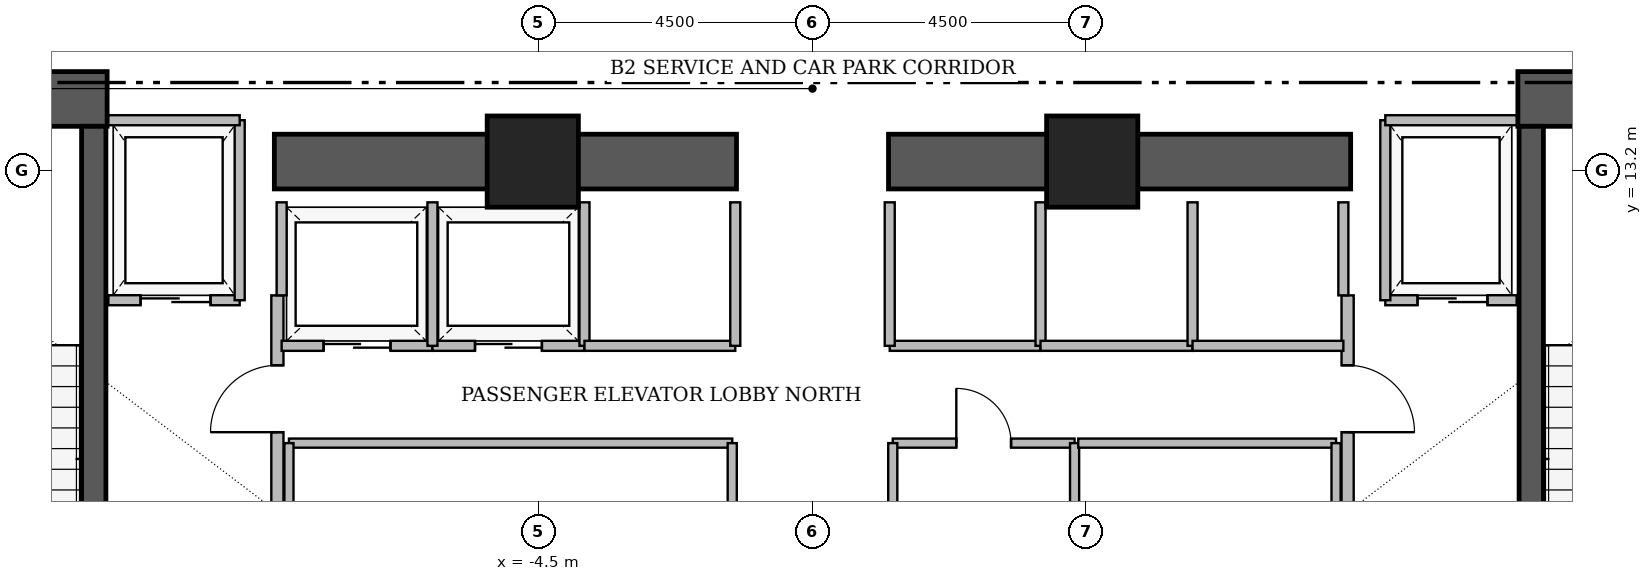
"""IFC4 building model, lengths in metres.
Left out: names, types, materials, properties, quantities, classifications, styles, units other than length and angle.
Written with IfcOpenShell. Run it as: python <this file> out.ifc"""

import sys

from ifc_helpers import new_model, si_unit, direction, frame, frame_2d, origin, origin_2d, place, context, subcontext, project, spatial, rectangle, extrude, element, fill, save


model = new_model("IFC4")
c1 = context("Model", 3, precision=1e-05, world=origin(), true_north=direction((0.0, 1.0)))
c2 = subcontext(c1, "Body", "Model", "MODEL_VIEW")
j1 = project(units=[si_unit("LENGTHUNIT", "METRE"), si_unit("PLANEANGLEUNIT", "RADIAN")], contexts=[c1])
p1 = place(None, origin())
s1 = spatial("IfcSite", under=j1, at=p1, CompositionType="ELEMENT")
p2 = place(p1, origin())
s2 = spatial("IfcBuilding", under=s1, at=p2, CompositionType="ELEMENT")
p3 = place(p2, frame((0.0, 0.0, -9.0)))
s3 = spatial("IfcBuildingStorey", under=s2, at=p3, CompositionType="ELEMENT", Elevation=-9.0)
for number, where, z_axis, x_axis in (
    (1, (-16.31, 14.38, 0.0), (0.0, 0.0, 1.0), (1.0, 0.0, 0.0)),
    (2, (11.6, 14.38, 0.0), (0.0, 0.0, 1.0), (1.0, 0.0, 0.0)),
):
    element("IfcWall", number, at=place(p3, frame(where, z_axis=z_axis, x_axis=x_axis)), inside=s3, PredefinedType="SHEAR", context=c2, shape_type="SweptSolid", body=[
        extrude(rectangle(XDim=4.71, YDim=0.9, at=frame_2d((2.355, 0.0))), origin(), (0.0, 0.0, 1.0), 4.31),
    ])
for number, where, z_axis, x_axis in (
    (3, (-8.85, 13.35, 0.0), (0.0, 0.0, 1.0), (1.0, 0.0, 0.0)),
    (4, (1.25, 13.35, 0.0), (0.0, 0.0, 1.0), (1.0, 0.0, 0.0)),
):
    element("IfcWall", number, at=place(p3, frame(where, z_axis=z_axis, x_axis=x_axis)), inside=s3, PredefinedType="SHEAR", context=c2, shape_type="SweptSolid", body=[
        extrude(rectangle(XDim=7.6, YDim=0.9, at=frame_2d((3.8, 0.0))), origin(), (0.0, 0.0, 1.0), 4.24),
    ])
p4 = place(p3, frame((-11.82, 4.97, 0.0), z_axis=(0.0, 0.0, 1.0), x_axis=(0.0, 1.0, 0.0)))
e5 = element("IfcWall", 5, at=p4, inside=s3, PredefinedType="SHEAR", context=c2, shape_type="SweptSolid", body=[
    extrude(rectangle(XDim=8.96, YDim=0.4, at=frame_2d((4.48, 0.0))), origin(), (0.0, 0.0, 1.0), 4.31),
])
p5 = place(p4, frame((0.31, 0.0, 0.0)))
e6 = element("IfcOpeningElement", 6, at=p5, cuts=e5, PredefinedType="OPENING", context=c2, shape_type="SweptSolid", body=[
    extrude(rectangle(XDim=1.12, YDim=2.22, at=frame_2d((0.56, 1.11))), frame((0.0, 0.21, 0.0), z_axis=(0.0, -1.0, 0.0), x_axis=(1.0, 0.0, 0.0)), (0.0, 0.0, 1.0), 0.42),
])
p6 = place(p3, frame((11.82, 13.93, 0.0), z_axis=(0.0, 0.0, 1.0), x_axis=(0.0, -1.0, 0.0)))
e7 = element("IfcWall", 7, at=p6, inside=s3, PredefinedType="SHEAR", context=c2, shape_type="SweptSolid", body=[
    extrude(rectangle(XDim=8.96, YDim=0.4, at=frame_2d((4.48, 0.0))), origin(), (0.0, 0.0, 1.0), 4.31),
])
p7 = place(p6, frame((7.53, 0.0, 0.0)))
e8 = element("IfcOpeningElement", 8, at=p7, cuts=e7, PredefinedType="OPENING", context=c2, shape_type="SweptSolid", body=[
    extrude(rectangle(XDim=1.12, YDim=2.22, at=frame_2d((0.56, 1.11))), frame((0.0, 0.21, 0.0), z_axis=(0.0, -1.0, 0.0), x_axis=(1.0, 0.0, 0.0)), (0.0, 0.0, 1.0), 0.42),
])
for number, where, z_axis, x_axis in (
    (9, (-4.6, 13.35, 0.0), (0.0, 0.0, 1.0), (1.0, 0.0, 0.0)),
    (10, (4.6, 13.35, 0.0), (0.0, 0.0, 1.0), (1.0, 0.0, 0.0)),
):
    element("IfcColumn", number, at=place(p3, frame(where, z_axis=z_axis, x_axis=x_axis)), inside=s3, PredefinedType="COLUMN", context=c2, shape_type="SweptSolid", body=[
        extrude(rectangle(XDim=1.5, YDim=1.5, at=origin_2d()), origin(), (0.0, 0.0, 1.0), 4.5),
    ])
p8 = place(p3, frame((-8.8, 5.05, 0.0), z_axis=(0.0, 0.0, 1.0), x_axis=(0.0, 1.0, 0.0)))
e11 = element("IfcWall", 11, at=p8, inside=s3, PredefinedType="PARTITIONING", context=c2, shape_type="SweptSolid", body=[
    extrude(rectangle(XDim=6.1, YDim=0.2, at=frame_2d((3.05, 0.0))), origin(), (0.0, 0.0, 1.0), 4.24),
])
p9 = place(p8, frame((0.25, 0.0, 0.0)))
e12 = element("IfcOpeningElement", 12, at=p9, cuts=e11, PredefinedType="OPENING", context=c2, shape_type="SweptSolid", body=[
    extrude(rectangle(XDim=1.1, YDim=2.2, at=frame_2d((0.55, 1.1))), frame((0.0, 0.11, 0.0), z_axis=(0.0, -1.0, 0.0), x_axis=(1.0, 0.0, 0.0)), (0.0, 0.0, 1.0), 0.22),
])
p10 = place(p8, frame((3.85, 0.0, 0.0)))
e13 = element("IfcOpeningElement", 13, at=p10, cuts=e11, PredefinedType="OPENING", context=c2, shape_type="SweptSolid", body=[
    extrude(rectangle(XDim=1.1, YDim=2.2, at=frame_2d((0.55, 1.1))), frame((0.0, 0.11, 0.0), z_axis=(0.0, -1.0, 0.0), x_axis=(1.0, 0.0, 0.0)), (0.0, 0.0, 1.0), 0.22),
])
p11 = place(p3, frame((8.8, 11.15, 0.0), z_axis=(0.0, 0.0, 1.0), x_axis=(0.0, -1.0, 0.0)))
e14 = element("IfcWall", 14, at=p11, inside=s3, PredefinedType="PARTITIONING", context=c2, shape_type="SweptSolid", body=[
    extrude(rectangle(XDim=6.1, YDim=0.2, at=frame_2d((3.05, 0.0))), origin(), (0.0, 0.0, 1.0), 4.24),
])
p12 = place(p11, frame((1.15, 0.0, 0.0)))
e15 = element("IfcOpeningElement", 15, at=p12, cuts=e14, PredefinedType="OPENING", context=c2, shape_type="SweptSolid", body=[
    extrude(rectangle(XDim=1.1, YDim=2.2, at=frame_2d((0.55, 1.1))), frame((0.0, 0.11, 0.0), z_axis=(0.0, -1.0, 0.0), x_axis=(1.0, 0.0, 0.0)), (0.0, 0.0, 1.0), 0.22),
])
p13 = place(p11, frame((4.75, 0.0, 0.0)))
e16 = element("IfcOpeningElement", 16, at=p13, cuts=e14, PredefinedType="OPENING", context=c2, shape_type="SweptSolid", body=[
    extrude(rectangle(XDim=1.1, YDim=2.2, at=frame_2d((0.55, 1.1))), frame((0.0, 0.11, 0.0), z_axis=(0.0, -1.0, 0.0), x_axis=(1.0, 0.0, 0.0)), (0.0, 0.0, 1.0), 0.22),
])
p14 = place(p3, frame((-11.58, 11.07, 0.0), z_axis=(0.0, 0.0, 1.0), x_axis=(1.0, 0.0, 0.0)))
e17 = element("IfcWall", 17, at=p14, inside=s3, PredefinedType="PARTITIONING", context=c2, shape_type="SweptSolid", body=[
    extrude(rectangle(XDim=2.16, YDim=0.165, at=frame_2d((1.08, 0.0))), origin(), (0.0, 0.0, 1.0), 4.24),
])
p15 = place(p14, frame((0.53, 0.0, 0.0)))
e18 = element("IfcOpeningElement", 18, at=p15, cuts=e17, PredefinedType="OPENING", context=c2, shape_type="SweptSolid", body=[
    extrude(rectangle(XDim=1.15, YDim=2.25, at=frame_2d((0.575, 1.125))), frame((0.0, 0.093, 0.0), z_axis=(0.0, -1.0, 0.0), x_axis=(1.0, 0.0, 0.0)), (0.0, 0.0, 1.0), 0.185),
])
p16 = place(p3, frame((9.42, 11.07, 0.0), z_axis=(0.0, 0.0, 1.0), x_axis=(1.0, 0.0, 0.0)))
e19 = element("IfcWall", 19, at=p16, inside=s3, PredefinedType="PARTITIONING", context=c2, shape_type="SweptSolid", body=[
    extrude(rectangle(XDim=2.16, YDim=0.165, at=frame_2d((1.08, 0.0))), origin(), (0.0, 0.0, 1.0), 4.24),
])
p17 = place(p16, frame((0.53, 0.0, 0.0)))
e20 = element("IfcOpeningElement", 20, at=p17, cuts=e19, PredefinedType="OPENING", context=c2, shape_type="SweptSolid", body=[
    extrude(rectangle(XDim=1.15, YDim=2.25, at=frame_2d((0.575, 1.125))), frame((0.0, 0.093, 0.0), z_axis=(0.0, -1.0, 0.0), x_axis=(1.0, 0.0, 0.0)), (0.0, 0.0, 1.0), 0.185),
])
p18 = place(p3, frame((-8.73, 10.32, 0.0), z_axis=(0.0, 0.0, 1.0), x_axis=(1.0, 0.0, 0.0)))
e21 = element("IfcWall", 21, at=p18, inside=s3, PredefinedType="PARTITIONING", context=c2, shape_type="SweptSolid", body=[
    extrude(rectangle(XDim=2.48, YDim=0.165, at=frame_2d((1.24, 0.0))), origin(), (0.0, 0.0, 1.0), 4.24),
])
p19 = place(p18, frame((0.69, 0.0, 0.0)))
e22 = element("IfcOpeningElement", 22, at=p19, cuts=e21, PredefinedType="OPENING", context=c2, shape_type="SweptSolid", body=[
    extrude(rectangle(XDim=1.1, YDim=2.25, at=frame_2d((0.55, 1.125))), frame((0.0, 0.093, 0.0), z_axis=(0.0, -1.0, 0.0), x_axis=(1.0, 0.0, 0.0)), (0.0, 0.0, 1.0), 0.185),
])
p20 = place(p3, frame((-6.25, 10.32, 0.0), z_axis=(0.0, 0.0, 1.0), x_axis=(1.0, 0.0, 0.0)))
e23 = element("IfcWall", 23, at=p20, inside=s3, PredefinedType="PARTITIONING", context=c2, shape_type="SweptSolid", body=[
    extrude(rectangle(XDim=2.5, YDim=0.165, at=frame_2d((1.25, 0.0))), origin(), (0.0, 0.0, 1.0), 4.24),
])
p21 = place(p20, frame((0.7, 0.0, 0.0)))
e24 = element("IfcOpeningElement", 24, at=p21, cuts=e23, PredefinedType="OPENING", context=c2, shape_type="SweptSolid", body=[
    extrude(rectangle(XDim=1.1, YDim=2.25, at=frame_2d((0.55, 1.125))), frame((0.0, 0.093, 0.0), z_axis=(0.0, -1.0, 0.0), x_axis=(1.0, 0.0, 0.0)), (0.0, 0.0, 1.0), 0.185),
])
p22 = place(p3, frame((1.32, 8.72, 0.0), z_axis=(0.0, 0.0, 1.0), x_axis=(1.0, 0.0, 0.0)))
e25 = element("IfcWall", 25, at=p22, inside=s3, PredefinedType="PARTITIONING", context=c2, shape_type="SweptSolid", body=[
    extrude(rectangle(XDim=2.99, YDim=0.15, at=frame_2d((1.495, 0.0))), origin(), (0.0, 0.0, 1.0), 4.24),
])
p23 = place(p22, frame((1.045, 0.0, 0.0)))
e26 = element("IfcOpeningElement", 26, at=p23, cuts=e25, PredefinedType="OPENING", context=c2, shape_type="SweptSolid", body=[
    extrude(rectangle(XDim=0.9, YDim=2.15, at=frame_2d((0.45, 1.075))), frame((0.0, 0.085, 0.0), z_axis=(0.0, -1.0, 0.0), x_axis=(1.0, 0.0, 0.0)), (0.0, 0.0, 1.0), 0.17),
])
p24 = place(p3, frame((-9.42, 11.07, 0.0), z_axis=(0.0, 0.0, 1.0), x_axis=(0.0, 1.0, 0.0)))
e27 = element("IfcWall", 27, at=p24, inside=s3, PredefinedType="PARTITIONING", context=c2, shape_type="SweptSolid", body=[
    extrude(rectangle(XDim=2.96, YDim=0.165, at=frame_2d((1.48, 0.0))), origin(), (0.0, 0.0, 1.0), 4.24),
])
p25 = place(p3, frame((-11.58, 14.03, 0.0), z_axis=(0.0, 0.0, 1.0), x_axis=(1.0, 0.0, 0.0)))
e28 = element("IfcWall", 28, at=p25, inside=s3, PredefinedType="PARTITIONING", context=c2, shape_type="SweptSolid", body=[
    extrude(rectangle(XDim=2.16, YDim=0.165, at=frame_2d((1.08, 0.0))), origin(), (0.0, 0.0, 1.0), 4.24),
])
p26 = place(p3, frame((9.42, 11.07, 0.0), z_axis=(0.0, 0.0, 1.0), x_axis=(0.0, 1.0, 0.0)))
e29 = element("IfcWall", 29, at=p26, inside=s3, PredefinedType="PARTITIONING", context=c2, shape_type="SweptSolid", body=[
    extrude(rectangle(XDim=2.96, YDim=0.165, at=frame_2d((1.48, 0.0))), origin(), (0.0, 0.0, 1.0), 4.24),
])
p27 = place(p3, frame((9.42, 14.03, 0.0), z_axis=(0.0, 0.0, 1.0), x_axis=(1.0, 0.0, 0.0)))
e30 = element("IfcWall", 30, at=p27, inside=s3, PredefinedType="PARTITIONING", context=c2, shape_type="SweptSolid", body=[
    extrude(rectangle(XDim=2.16, YDim=0.165, at=frame_2d((1.08, 0.0))), origin(), (0.0, 0.0, 1.0), 4.24),
])
p28 = place(p3, frame((-8.73, 11.15, 0.0), z_axis=(0.0, 0.0, 1.0), x_axis=(0.0, 1.0, 0.0)))
e31 = element("IfcWall", 31, at=p28, inside=s3, PredefinedType="PARTITIONING", context=c2, shape_type="SweptSolid", body=[
    extrude(rectangle(XDim=1.53, YDim=0.165, at=frame_2d((0.765, 0.0))), origin(), (0.0, 0.0, 1.0), 4.24),
])
for number, where, z_axis, x_axis in (
    (32, (-6.25, 10.32, 0.0), (0.0, 0.0, 1.0), (0.0, 1.0, 0.0)),
    (33, (-3.75, 10.32, 0.0), (0.0, 0.0, 1.0), (0.0, 1.0, 0.0)),
):
    element("IfcWall", number, at=place(p3, frame(where, z_axis=z_axis, x_axis=x_axis)), inside=s3, PredefinedType="PARTITIONING", context=c2, shape_type="SweptSolid", body=[
        extrude(rectangle(XDim=2.36, YDim=0.165, at=frame_2d((1.18, 0.0))), origin(), (0.0, 0.0, 1.0), 4.24),
    ])
p29 = place(p3, frame((-3.75, 10.32, 0.0), z_axis=(0.0, 0.0, 1.0), x_axis=(1.0, 0.0, 0.0)))
e34 = element("IfcWall", 34, at=p29, inside=s3, PredefinedType="PARTITIONING", context=c2, shape_type="SweptSolid", body=[
    extrude(rectangle(XDim=2.48, YDim=0.165, at=frame_2d((1.24, 0.0))), origin(), (0.0, 0.0, 1.0), 4.24),
])
p30 = place(p3, frame((-1.27, 10.32, 0.0), z_axis=(0.0, 0.0, 1.0), x_axis=(0.0, 1.0, 0.0)))
e35 = element("IfcWall", 35, at=p30, inside=s3, PredefinedType="PARTITIONING", context=c2, shape_type="SweptSolid", body=[
    extrude(rectangle(XDim=2.36, YDim=0.165, at=frame_2d((1.18, 0.0))), origin(), (0.0, 0.0, 1.0), 4.24),
])
p31 = place(p3, frame((1.27, 10.32, 0.0), z_axis=(0.0, 0.0, 1.0), x_axis=(1.0, 0.0, 0.0)))
e36 = element("IfcWall", 36, at=p31, inside=s3, PredefinedType="PARTITIONING", context=c2, shape_type="SweptSolid", body=[
    extrude(rectangle(XDim=2.48, YDim=0.165, at=frame_2d((1.24, 0.0))), origin(), (0.0, 0.0, 1.0), 4.24),
])
for number, where, z_axis, x_axis in (
    (37, (1.27, 10.32, 0.0), (0.0, 0.0, 1.0), (0.0, 1.0, 0.0)),
    (38, (3.75, 10.32, 0.0), (0.0, 0.0, 1.0), (0.0, 1.0, 0.0)),
):
    element("IfcWall", number, at=place(p3, frame(where, z_axis=z_axis, x_axis=x_axis)), inside=s3, PredefinedType="PARTITIONING", context=c2, shape_type="SweptSolid", body=[
        extrude(rectangle(XDim=2.36, YDim=0.165, at=frame_2d((1.18, 0.0))), origin(), (0.0, 0.0, 1.0), 4.24),
    ])
p32 = place(p3, frame((3.75, 10.32, 0.0), z_axis=(0.0, 0.0, 1.0), x_axis=(1.0, 0.0, 0.0)))
e39 = element("IfcWall", 39, at=p32, inside=s3, PredefinedType="PARTITIONING", context=c2, shape_type="SweptSolid", body=[
    extrude(rectangle(XDim=2.5, YDim=0.165, at=frame_2d((1.25, 0.0))), origin(), (0.0, 0.0, 1.0), 4.24),
])
p33 = place(p3, frame((6.25, 10.32, 0.0), z_axis=(0.0, 0.0, 1.0), x_axis=(0.0, 1.0, 0.0)))
e40 = element("IfcWall", 40, at=p33, inside=s3, PredefinedType="PARTITIONING", context=c2, shape_type="SweptSolid", body=[
    extrude(rectangle(XDim=2.36, YDim=0.165, at=frame_2d((1.18, 0.0))), origin(), (0.0, 0.0, 1.0), 4.24),
])
p34 = place(p3, frame((6.25, 10.32, 0.0), z_axis=(0.0, 0.0, 1.0), x_axis=(1.0, 0.0, 0.0)))
e41 = element("IfcWall", 41, at=p34, inside=s3, PredefinedType="PARTITIONING", context=c2, shape_type="SweptSolid", body=[
    extrude(rectangle(XDim=2.48, YDim=0.165, at=frame_2d((1.24, 0.0))), origin(), (0.0, 0.0, 1.0), 4.24),
])
p35 = place(p3, frame((8.73, 11.15, 0.0), z_axis=(0.0, 0.0, 1.0), x_axis=(0.0, 1.0, 0.0)))
e42 = element("IfcWall", 42, at=p35, inside=s3, PredefinedType="PARTITIONING", context=c2, shape_type="SweptSolid", body=[
    extrude(rectangle(XDim=1.53, YDim=0.165, at=frame_2d((0.765, 0.0))), origin(), (0.0, 0.0, 1.0), 4.24),
])
p36 = place(p3, frame((-8.61, 8.72, 0.0), z_axis=(0.0, 0.0, 1.0), x_axis=(1.0, 0.0, 0.0)))
e43 = element("IfcWall", 43, at=p36, inside=s3, PredefinedType="PARTITIONING", context=c2, shape_type="SweptSolid", body=[
    extrude(rectangle(XDim=7.29, YDim=0.15, at=frame_2d((3.645, 0.0))), origin(), (0.0, 0.0, 1.0), 4.24),
])
for number, where, z_axis, x_axis in (
    (44, (-8.61, 6.48, 0.0), (0.0, 0.0, 1.0), (0.0, 1.0, 0.0)),
    (45, (-1.32, 6.48, 0.0), (0.0, 0.0, 1.0), (0.0, 1.0, 0.0)),
    (46, (1.32, 6.48, 0.0), (0.0, 0.0, 1.0), (0.0, 1.0, 0.0)),
    (47, (4.31, 6.48, 0.0), (0.0, 0.0, 1.0), (0.0, 1.0, 0.0)),
):
    element("IfcWall", number, at=place(p3, frame(where, z_axis=z_axis, x_axis=x_axis)), inside=s3, PredefinedType="PARTITIONING", context=c2, shape_type="SweptSolid", body=[
        extrude(rectangle(XDim=2.24, YDim=0.15, at=frame_2d((1.12, 0.0))), origin(), (0.0, 0.0, 1.0), 4.24),
    ])
p37 = place(p3, frame((4.37, 8.72, 0.0), z_axis=(0.0, 0.0, 1.0), x_axis=(1.0, 0.0, 0.0)))
e48 = element("IfcWall", 48, at=p37, inside=s3, PredefinedType="PARTITIONING", context=c2, shape_type="SweptSolid", body=[
    extrude(rectangle(XDim=4.24, YDim=0.15, at=frame_2d((2.12, 0.0))), origin(), (0.0, 0.0, 1.0), 4.24),
])
p38 = place(p3, frame((8.61, 6.48, 0.0), z_axis=(0.0, 0.0, 1.0), x_axis=(0.0, 1.0, 0.0)))
e49 = element("IfcWall", 49, at=p38, inside=s3, PredefinedType="PARTITIONING", context=c2, shape_type="SweptSolid", body=[
    extrude(rectangle(XDim=2.24, YDim=0.15, at=frame_2d((1.12, 0.0))), origin(), (0.0, 0.0, 1.0), 4.24),
])
p39 = place(p10, origin())
e50 = element("IfcDoor", 50, at=p39, inside=s3, OperationType="SINGLE_SWING_LEFT", PredefinedType="DOOR", context=c2, shape_type="SweptSolid", body=[
    extrude(rectangle(XDim=1.1, YDim=2.2, at=frame_2d((0.55, 1.1))), frame((0.0, 0.025, 0.0), z_axis=(0.0, -1.0, 0.0), x_axis=(1.0, 0.0, 0.0)), (0.0, 0.0, 1.0), 0.05),
])
fill(e13, e50)
p40 = place(p12, origin())
e51 = element("IfcDoor", 51, at=p40, inside=s3, OperationType="SINGLE_SWING_RIGHT", PredefinedType="DOOR", context=c2, shape_type="SweptSolid", body=[
    extrude(rectangle(XDim=1.1, YDim=2.2, at=frame_2d((0.55, 1.1))), frame((0.0, 0.025, 0.0), z_axis=(0.0, -1.0, 0.0), x_axis=(1.0, 0.0, 0.0)), (0.0, 0.0, 1.0), 0.05),
])
fill(e15, e51)
p41 = place(p15, origin())
e52 = element("IfcDoor", 52, at=p41, inside=s3, OperationType="SLIDING_TO_LEFT", PredefinedType="DOOR", context=c2, shape_type="SweptSolid", body=[
    extrude(rectangle(XDim=1.15, YDim=2.25, at=frame_2d((0.575, 1.125))), frame((0.0, 0.025, 0.0), z_axis=(0.0, -1.0, 0.0), x_axis=(1.0, 0.0, 0.0)), (0.0, 0.0, 1.0), 0.05),
])
fill(e18, e52)
p42 = place(p17, origin())
e53 = element("IfcDoor", 53, at=p42, inside=s3, OperationType="SLIDING_TO_LEFT", PredefinedType="DOOR", context=c2, shape_type="SweptSolid", body=[
    extrude(rectangle(XDim=1.15, YDim=2.25, at=frame_2d((0.575, 1.125))), frame((0.0, 0.025, 0.0), z_axis=(0.0, -1.0, 0.0), x_axis=(1.0, 0.0, 0.0)), (0.0, 0.0, 1.0), 0.05),
])
fill(e20, e53)
p43 = place(p19, origin())
e54 = element("IfcDoor", 54, at=p43, inside=s3, OperationType="SLIDING_TO_LEFT", PredefinedType="DOOR", context=c2, shape_type="SweptSolid", body=[
    extrude(rectangle(XDim=1.1, YDim=2.25, at=frame_2d((0.55, 1.125))), frame((0.0, 0.025, 0.0), z_axis=(0.0, -1.0, 0.0), x_axis=(1.0, 0.0, 0.0)), (0.0, 0.0, 1.0), 0.05),
])
fill(e22, e54)
p44 = place(p21, origin())
e55 = element("IfcDoor", 55, at=p44, inside=s3, OperationType="SLIDING_TO_LEFT", PredefinedType="DOOR", context=c2, shape_type="SweptSolid", body=[
    extrude(rectangle(XDim=1.1, YDim=2.25, at=frame_2d((0.55, 1.125))), frame((0.0, 0.025, 0.0), z_axis=(0.0, -1.0, 0.0), x_axis=(1.0, 0.0, 0.0)), (0.0, 0.0, 1.0), 0.05),
])
fill(e24, e55)
p45 = place(p23, origin())
e56 = element("IfcDoor", 56, at=p45, inside=s3, OperationType="SINGLE_SWING_LEFT", PredefinedType="DOOR", context=c2, shape_type="SweptSolid", body=[
    extrude(rectangle(XDim=0.9, YDim=2.15, at=frame_2d((0.45, 1.075))), frame((0.0, 0.025, 0.0), z_axis=(0.0, -1.0, 0.0), x_axis=(1.0, 0.0, 0.0)), (0.0, 0.0, 1.0), 0.05),
])
fill(e26, e56)
save(model, sys.argv[1])
